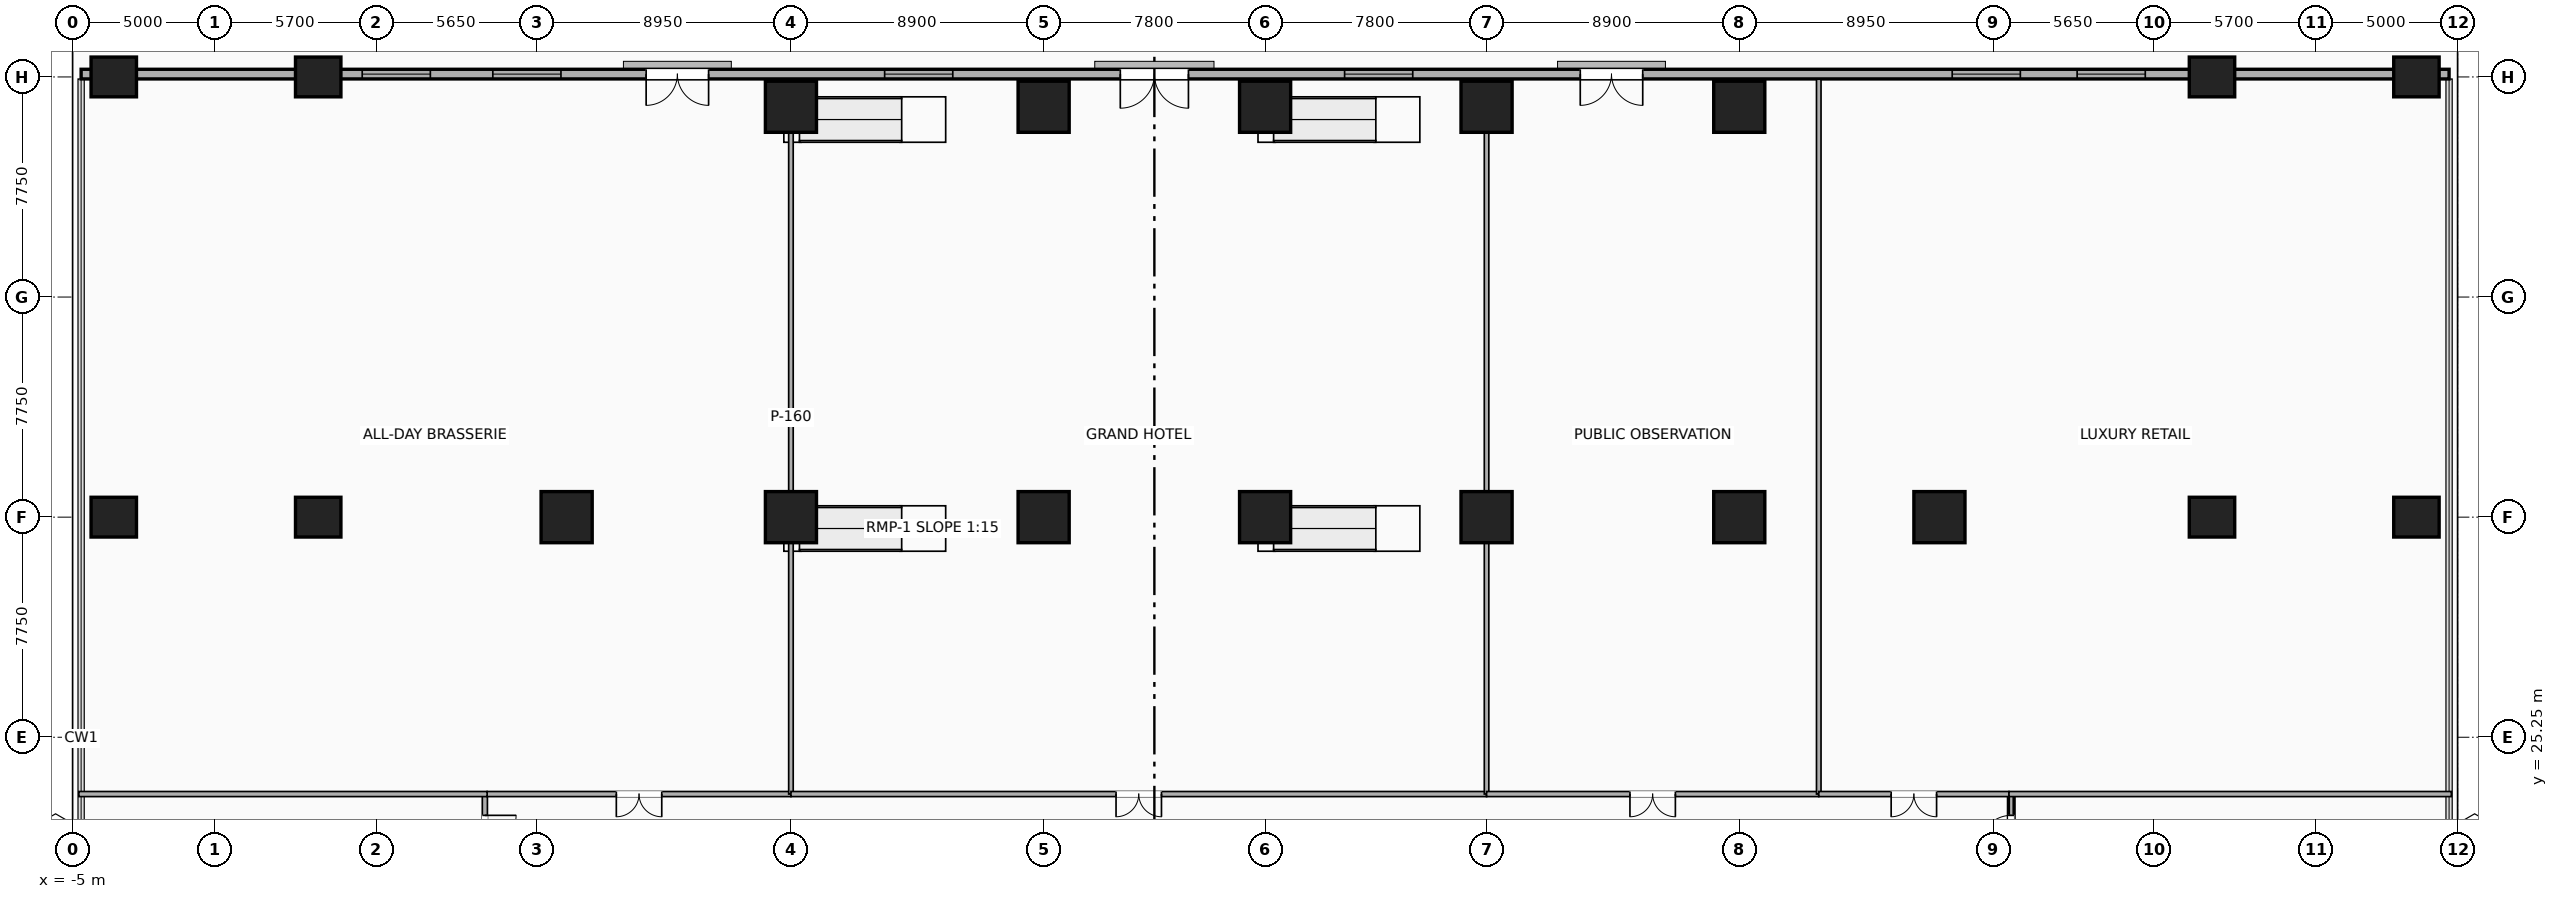
"""IFC4 building model, lengths in metres.
Left out: names, types, materials, properties, quantities, classifications, styles, units other than length and angle.
Written with IfcOpenShell. Run it as: python <this file> out.ifc"""

import sys

from ifc_helpers import new_model, si_unit, direction, frame, frame_2d, origin, origin_2d, place, context, subcontext, project, spatial, rectangle, extrude, element, fill, save


model = new_model("IFC4")
c1 = context("Model", 3, precision=1e-05, world=origin(), true_north=direction((0.0, 1.0)))
c2 = subcontext(c1, "Body", "Model", "MODEL_VIEW")
j1 = project(units=[si_unit("LENGTHUNIT", "METRE"), si_unit("PLANEANGLEUNIT", "RADIAN")], contexts=[c1])
p1 = place(None, origin())
s1 = spatial("IfcSite", under=j1, at=p1, CompositionType="ELEMENT")
p2 = place(p1, origin())
s2 = spatial("IfcBuilding", under=s1, at=p2, CompositionType="ELEMENT")
p3 = place(p2, origin())
s3 = spatial("IfcBuildingStorey", under=s2, at=p3, CompositionType="ELEMENT", Elevation=0.0)
for number, where, z_axis, x_axis in (
    (1, (20.3, 33.0, -0.35), (0.0, 0.0, 1.0), (1.0, 0.0, 0.0)),
    (2, (29.2, 33.0, -0.35), (0.0, 0.0, 1.0), (1.0, 0.0, 0.0)),
    (3, (37.0, 33.0, -0.35), (0.0, 0.0, 1.0), (1.0, 0.0, 0.0)),
    (4, (44.8, 33.0, -0.35), (0.0, 0.0, 1.0), (1.0, 0.0, 0.0)),
    (5, (12.4, 33.0, -0.35), (0.0, 0.0, 1.0), (1.0, 0.0, 0.0)),
    (6, (20.3, 47.45, -0.35), (0.0, 0.0, 1.0), (1.0, 0.0, 0.0)),
    (7, (29.2, 47.45, -0.35), (0.0, 0.0, 1.0), (1.0, 0.0, 0.0)),
    (8, (37.0, 47.45, -0.35), (0.0, 0.0, 1.0), (1.0, 0.0, 0.0)),
    (9, (44.8, 47.45, -0.35), (0.0, 0.0, 1.0), (1.0, 0.0, 0.0)),
    (10, (53.7, 47.45, -0.35), (0.0, 0.0, 1.0), (1.0, 0.0, 0.0)),
    (11, (60.75, 33.0, -0.35), (0.0, 0.0, 1.0), (1.0, 0.0, 0.0)),
    (12, (53.7, 33.0, -0.35), (0.0, 0.0, 1.0), (1.0, 0.0, 0.0)),
):
    element("IfcColumn", number, at=place(p3, frame(where, z_axis=z_axis, x_axis=x_axis)), inside=s3, PredefinedType="COLUMN", context=c2, shape_type="SweptSolid", body=[
        extrude(rectangle(XDim=1.8, YDim=1.8, at=origin_2d()), origin(), (0.0, 0.0, 1.0), 5.45),
    ])
for number, where, z_axis, x_axis in (
    (13, (-3.55, 33.0, -0.35), (0.0, 0.0, 1.0), (1.0, 0.0, 0.0)),
    (14, (3.65, 33.0, -0.35), (0.0, 0.0, 1.0), (1.0, 0.0, 0.0)),
    (15, (-3.55, 48.5, -0.35), (0.0, 0.0, 1.0), (1.0, 0.0, 0.0)),
    (16, (3.65, 48.5, -0.35), (0.0, 0.0, 1.0), (1.0, 0.0, 0.0)),
    (17, (70.35, 33.0, -0.35), (0.0, 0.0, 1.0), (1.0, 0.0, 0.0)),
    (18, (77.55, 33.0, -0.35), (0.0, 0.0, 1.0), (1.0, 0.0, 0.0)),
    (19, (70.35, 48.5, -0.35), (0.0, 0.0, 1.0), (1.0, 0.0, 0.0)),
    (20, (77.55, 48.5, -0.35), (0.0, 0.0, 1.0), (1.0, 0.0, 0.0)),
):
    element("IfcColumn", number, at=place(p3, frame(where, z_axis=z_axis, x_axis=x_axis)), inside=s3, PredefinedType="COLUMN", context=c2, shape_type="SweptSolid", body=[
        extrude(rectangle(XDim=1.6, YDim=1.4, at=origin_2d()), origin(), (0.0, 0.0, 1.0), 5.45),
    ])
p4 = place(p3, frame((-4.7, 48.6, 0.0), z_axis=(0.0, 0.0, 1.0), x_axis=(1.0, 0.0, 0.0)))
e21 = element("IfcWall", 21, at=p4, inside=s3, PredefinedType="SOLIDWALL", context=c2, shape_type="SweptSolid", body=[
    extrude(rectangle(XDim=83.4, YDim=0.34, at=frame_2d((41.7, 0.0))), origin(), (0.0, 0.0, 1.0), 4.164),
])
p5 = place(p4, frame((19.9, 0.0, 0.0)))
e22 = element("IfcOpeningElement", 22, at=p5, cuts=e21, PredefinedType="OPENING", context=c2, shape_type="SweptSolid", body=[
    extrude(rectangle(XDim=2.2, YDim=2.5, at=frame_2d((1.1, 1.25))), frame((0.0, 0.18, 0.0), z_axis=(0.0, -1.0, 0.0), x_axis=(1.0, 0.0, 0.0)), (0.0, 0.0, 1.0), 0.36),
])
p6 = place(p4, frame((36.6, 0.0, 0.0)))
e23 = element("IfcOpeningElement", 23, at=p6, cuts=e21, PredefinedType="OPENING", context=c2, shape_type="SweptSolid", body=[
    extrude(rectangle(XDim=2.4, YDim=2.6, at=frame_2d((1.2, 1.3))), frame((0.0, 0.18, 0.0), z_axis=(0.0, -1.0, 0.0), x_axis=(1.0, 0.0, 0.0)), (0.0, 0.0, 1.0), 0.36),
])
p7 = place(p4, frame((52.8, 0.0, 0.0)))
e24 = element("IfcOpeningElement", 24, at=p7, cuts=e21, PredefinedType="OPENING", context=c2, shape_type="SweptSolid", body=[
    extrude(rectangle(XDim=2.2, YDim=2.5, at=frame_2d((1.1, 1.25))), frame((0.0, 0.18, 0.0), z_axis=(0.0, -1.0, 0.0), x_axis=(1.0, 0.0, 0.0)), (0.0, 0.0, 1.0), 0.36),
])
p8 = place(p4, frame((9.9, 0.0, 0.9)))
e25 = element("IfcOpeningElement", 25, at=p8, cuts=e21, PredefinedType="OPENING", context=c2, shape_type="SweptSolid", body=[
    extrude(rectangle(XDim=2.4, YDim=2.6, at=frame_2d((1.2, 1.3))), frame((0.0, 0.18, 0.0), z_axis=(0.0, -1.0, 0.0), x_axis=(1.0, 0.0, 0.0)), (0.0, 0.0, 1.0), 0.36),
])
p9 = place(p4, frame((14.5, 0.0, 0.9)))
e26 = element("IfcOpeningElement", 26, at=p9, cuts=e21, PredefinedType="OPENING", context=c2, shape_type="SweptSolid", body=[
    extrude(rectangle(XDim=2.4, YDim=2.6, at=frame_2d((1.2, 1.3))), frame((0.0, 0.18, 0.0), z_axis=(0.0, -1.0, 0.0), x_axis=(1.0, 0.0, 0.0)), (0.0, 0.0, 1.0), 0.36),
])
p10 = place(p4, frame((28.3, 0.0, 0.9)))
e27 = element("IfcOpeningElement", 27, at=p10, cuts=e21, PredefinedType="OPENING", context=c2, shape_type="SweptSolid", body=[
    extrude(rectangle(XDim=2.4, YDim=2.6, at=frame_2d((1.2, 1.3))), frame((0.0, 0.18, 0.0), z_axis=(0.0, -1.0, 0.0), x_axis=(1.0, 0.0, 0.0)), (0.0, 0.0, 1.0), 0.36),
])
p11 = place(p4, frame((44.5, 0.0, 0.9)))
e28 = element("IfcOpeningElement", 28, at=p11, cuts=e21, PredefinedType="OPENING", context=c2, shape_type="SweptSolid", body=[
    extrude(rectangle(XDim=2.4, YDim=2.6, at=frame_2d((1.2, 1.3))), frame((0.0, 0.18, 0.0), z_axis=(0.0, -1.0, 0.0), x_axis=(1.0, 0.0, 0.0)), (0.0, 0.0, 1.0), 0.36),
])
p12 = place(p4, frame((65.9, 0.0, 0.9)))
e29 = element("IfcOpeningElement", 29, at=p12, cuts=e21, PredefinedType="OPENING", context=c2, shape_type="SweptSolid", body=[
    extrude(rectangle(XDim=2.4, YDim=2.6, at=frame_2d((1.2, 1.3))), frame((0.0, 0.18, 0.0), z_axis=(0.0, -1.0, 0.0), x_axis=(1.0, 0.0, 0.0)), (0.0, 0.0, 1.0), 0.36),
])
p13 = place(p4, frame((70.3, 0.0, 0.9)))
e30 = element("IfcOpeningElement", 30, at=p13, cuts=e21, PredefinedType="OPENING", context=c2, shape_type="SweptSolid", body=[
    extrude(rectangle(XDim=2.4, YDim=2.6, at=frame_2d((1.2, 1.3))), frame((0.0, 0.18, 0.0), z_axis=(0.0, -1.0, 0.0), x_axis=(1.0, 0.0, 0.0)), (0.0, 0.0, 1.0), 0.36),
])
p14 = place(p3, frame((9.52, 0.35, 0.0), z_axis=(0.0, 0.0, 1.0), x_axis=(0.0, 1.0, 0.0)))
e31 = element("IfcWall", 31, at=p14, inside=s3, PredefinedType="PARTITIONING", context=c2, shape_type="SweptSolid", body=[
    extrude(rectangle(XDim=22.9, YDim=0.18, at=frame_2d((11.45, 0.0))), origin(), (0.0, 0.0, 1.0), 5.1),
])
p15 = place(p14, frame((21.05, 0.0, 0.0)))
e32 = element("IfcOpeningElement", 32, at=p15, cuts=e31, PredefinedType="OPENING", context=c2, shape_type="SweptSolid", body=[
    extrude(rectangle(XDim=1.1, YDim=2.15, at=frame_2d((0.55, 1.075))), frame((0.0, 0.1, 0.0), z_axis=(0.0, -1.0, 0.0), x_axis=(1.0, 0.0, 0.0)), (0.0, 0.0, 1.0), 0.2),
])
p16 = place(p3, frame((63.28, 0.35, 0.0), z_axis=(0.0, 0.0, 1.0), x_axis=(0.0, 1.0, 0.0)))
e33 = element("IfcWall", 33, at=p16, inside=s3, PredefinedType="PARTITIONING", context=c2, shape_type="SweptSolid", body=[
    extrude(rectangle(XDim=22.9, YDim=0.2, at=frame_2d((11.45, 0.0))), origin(), (0.0, 0.0, 1.0), 4.164),
])
p17 = place(p16, frame((22.15, 0.0, 0.0), z_axis=(0.0, 0.0, 1.0), x_axis=(-1.0, 0.0, 0.0)))
e34 = element("IfcOpeningElement", 34, at=p17, cuts=e33, PredefinedType="OPENING", context=c2, shape_type="SweptSolid", body=[
    extrude(rectangle(XDim=1.1, YDim=2.15, at=frame_2d((0.55, 1.075))), frame((0.0, 0.11, 0.0), z_axis=(0.0, -1.0, 0.0), x_axis=(1.0, 0.0, 0.0)), (0.0, 0.0, 1.0), 0.22),
])
p18 = place(p3, frame((9.6, 23.25, 0.0), z_axis=(0.0, 0.0, 1.0), x_axis=(1.0, 0.0, 0.0)))
e35 = element("IfcWall", 35, at=p18, inside=s3, PredefinedType="PARTITIONING", context=c2, shape_type="SweptSolid", body=[
    extrude(rectangle(XDim=10.7, YDim=0.18, at=frame_2d((5.35, 0.0))), origin(), (0.0, 0.0, 1.0), 4.23),
])
p19 = place(p18, frame((4.55, 0.0, 0.0)))
e36 = element("IfcOpeningElement", 36, at=p19, cuts=e35, PredefinedType="OPENING", context=c2, shape_type="SweptSolid", body=[
    extrude(rectangle(XDim=1.6, YDim=2.22, at=frame_2d((0.8, 1.11))), frame((0.0, 0.1, 0.0), z_axis=(0.0, -1.0, 0.0), x_axis=(1.0, 0.0, 0.0)), (0.0, 0.0, 1.0), 0.2),
])
p20 = place(p3, frame((-4.78, 23.25, 0.0), z_axis=(0.0, 0.0, 1.0), x_axis=(1.0, 0.0, 0.0)))
e37 = element("IfcWall", 37, at=p20, inside=s3, PredefinedType="PARTITIONING", context=c2, shape_type="SweptSolid", body=[
    extrude(rectangle(XDim=14.38, YDim=0.18, at=frame_2d((7.19, 0.0))), origin(), (0.0, 0.0, 1.0), 4.23),
])
p21 = place(p3, frame((20.3, 23.25, 0.0), z_axis=(0.0, 0.0, 1.0), x_axis=(0.0, 1.0, 0.0)))
e38 = element("IfcWall", 38, at=p21, inside=s3, PredefinedType="PARTITIONING", context=c2, shape_type="SweptSolid", body=[
    extrude(rectangle(XDim=25.17, YDim=0.16, at=frame_2d((12.585, 0.0))), origin(), (0.0, 0.0, 1.0), 4.164),
])
p22 = place(p3, frame((20.3, 23.25, 0.0), z_axis=(0.0, 0.0, 1.0), x_axis=(1.0, 0.0, 0.0)))
e39 = element("IfcWall", 39, at=p22, inside=s3, PredefinedType="PARTITIONING", context=c2, shape_type="SweptSolid", body=[
    extrude(rectangle(XDim=24.5, YDim=0.18, at=frame_2d((12.25, 0.0))), origin(), (0.0, 0.0, 1.0), 4.23),
])
p23 = place(p22, frame((11.45, 0.0, 0.0)))
e40 = element("IfcOpeningElement", 40, at=p23, cuts=e39, PredefinedType="OPENING", context=c2, shape_type="SweptSolid", body=[
    extrude(rectangle(XDim=1.6, YDim=2.22, at=frame_2d((0.8, 1.11))), frame((0.0, 0.1, 0.0), z_axis=(0.0, -1.0, 0.0), x_axis=(1.0, 0.0, 0.0)), (0.0, 0.0, 1.0), 0.2),
])
p24 = place(p3, frame((44.8, 23.25, 0.0), z_axis=(0.0, 0.0, 1.0), x_axis=(0.0, 1.0, 0.0)))
e41 = element("IfcWall", 41, at=p24, inside=s3, PredefinedType="PARTITIONING", context=c2, shape_type="SweptSolid", body=[
    extrude(rectangle(XDim=25.17, YDim=0.16, at=frame_2d((12.585, 0.0))), origin(), (0.0, 0.0, 1.0), 4.164),
])
p25 = place(p3, frame((44.8, 23.25, 0.0), z_axis=(0.0, 0.0, 1.0), x_axis=(1.0, 0.0, 0.0)))
e42 = element("IfcWall", 42, at=p25, inside=s3, PredefinedType="PARTITIONING", context=c2, shape_type="SweptSolid", body=[
    extrude(rectangle(XDim=11.7, YDim=0.18, at=frame_2d((5.85, 0.0))), origin(), (0.0, 0.0, 1.0), 4.23),
])
p26 = place(p25, frame((5.05, 0.0, 0.0)))
e43 = element("IfcOpeningElement", 43, at=p26, cuts=e42, PredefinedType="OPENING", context=c2, shape_type="SweptSolid", body=[
    extrude(rectangle(XDim=1.6, YDim=2.22, at=frame_2d((0.8, 1.11))), frame((0.0, 0.1, 0.0), z_axis=(0.0, -1.0, 0.0), x_axis=(1.0, 0.0, 0.0)), (0.0, 0.0, 1.0), 0.2),
])
p27 = place(p3, frame((56.5, 23.25, 0.0), z_axis=(0.0, 0.0, 1.0), x_axis=(0.0, 1.0, 0.0)))
e44 = element("IfcWall", 44, at=p27, inside=s3, PredefinedType="PARTITIONING", context=c2, shape_type="SweptSolid", body=[
    extrude(rectangle(XDim=25.17, YDim=0.16, at=frame_2d((12.585, 0.0))), origin(), (0.0, 0.0, 1.0), 4.164),
])
p28 = place(p3, frame((56.5, 23.25, 0.0), z_axis=(0.0, 0.0, 1.0), x_axis=(1.0, 0.0, 0.0)))
e45 = element("IfcWall", 45, at=p28, inside=s3, PredefinedType="PARTITIONING", context=c2, shape_type="SweptSolid", body=[
    extrude(rectangle(XDim=6.7, YDim=0.18, at=frame_2d((3.35, 0.0))), origin(), (0.0, 0.0, 1.0), 4.23),
])
p29 = place(p28, frame((2.55, 0.0, 0.0)))
e46 = element("IfcOpeningElement", 46, at=p29, cuts=e45, PredefinedType="OPENING", context=c2, shape_type="SweptSolid", body=[
    extrude(rectangle(XDim=1.6, YDim=2.22, at=frame_2d((0.8, 1.11))), frame((0.0, 0.1, 0.0), z_axis=(0.0, -1.0, 0.0), x_axis=(1.0, 0.0, 0.0)), (0.0, 0.0, 1.0), 0.2),
])
p30 = place(p3, frame((63.2, 23.25, 0.0), z_axis=(0.0, 0.0, 1.0), x_axis=(1.0, 0.0, 0.0)))
e47 = element("IfcWall", 47, at=p30, inside=s3, PredefinedType="PARTITIONING", context=c2, shape_type="SweptSolid", body=[
    extrude(rectangle(XDim=15.58, YDim=0.18, at=frame_2d((7.79, 0.0))), origin(), (0.0, 0.0, 1.0), 4.23),
])
p31 = place(p5, origin())
e48 = element("IfcDoor", 48, at=p31, inside=s3, OperationType="DOUBLE_DOOR_SINGLE_SWING", PredefinedType="DOOR", context=c2, shape_type="SweptSolid", body=[
    extrude(rectangle(XDim=2.2, YDim=2.5, at=frame_2d((1.1, 1.25))), frame((0.0, 0.025, 0.0), z_axis=(0.0, -1.0, 0.0), x_axis=(1.0, 0.0, 0.0)), (0.0, 0.0, 1.0), 0.05),
])
fill(e22, e48)
p32 = place(p6, origin())
e49 = element("IfcDoor", 49, at=p32, inside=s3, OperationType="DOUBLE_DOOR_SINGLE_SWING", PredefinedType="DOOR", context=c2, shape_type="SweptSolid", body=[
    extrude(rectangle(XDim=2.4, YDim=2.6, at=frame_2d((1.2, 1.3))), frame((0.0, 0.025, 0.0), z_axis=(0.0, -1.0, 0.0), x_axis=(1.0, 0.0, 0.0)), (0.0, 0.0, 1.0), 0.05),
])
fill(e23, e49)
p33 = place(p7, origin())
e50 = element("IfcDoor", 50, at=p33, inside=s3, OperationType="DOUBLE_DOOR_SINGLE_SWING", PredefinedType="DOOR", context=c2, shape_type="SweptSolid", body=[
    extrude(rectangle(XDim=2.2, YDim=2.5, at=frame_2d((1.1, 1.25))), frame((0.0, 0.025, 0.0), z_axis=(0.0, -1.0, 0.0), x_axis=(1.0, 0.0, 0.0)), (0.0, 0.0, 1.0), 0.05),
])
fill(e24, e50)
p34 = place(p8, origin())
e51 = element("IfcWindow", 51, at=p34, inside=s3, PartitioningType="SINGLE_PANEL", PredefinedType="WINDOW", context=c2, shape_type="SweptSolid", body=[
    extrude(rectangle(XDim=2.4, YDim=2.6, at=frame_2d((1.2, 1.3))), frame((0.0, 0.03, 0.0), z_axis=(0.0, -1.0, 0.0), x_axis=(1.0, 0.0, 0.0)), (0.0, 0.0, 1.0), 0.06),
])
fill(e25, e51)
p35 = place(p9, origin())
e52 = element("IfcWindow", 52, at=p35, inside=s3, PartitioningType="SINGLE_PANEL", PredefinedType="WINDOW", context=c2, shape_type="SweptSolid", body=[
    extrude(rectangle(XDim=2.4, YDim=2.6, at=frame_2d((1.2, 1.3))), frame((0.0, 0.03, 0.0), z_axis=(0.0, -1.0, 0.0), x_axis=(1.0, 0.0, 0.0)), (0.0, 0.0, 1.0), 0.06),
])
fill(e26, e52)
p36 = place(p10, origin())
e53 = element("IfcWindow", 53, at=p36, inside=s3, PartitioningType="SINGLE_PANEL", PredefinedType="WINDOW", context=c2, shape_type="SweptSolid", body=[
    extrude(rectangle(XDim=2.4, YDim=2.6, at=frame_2d((1.2, 1.3))), frame((0.0, 0.03, 0.0), z_axis=(0.0, -1.0, 0.0), x_axis=(1.0, 0.0, 0.0)), (0.0, 0.0, 1.0), 0.06),
])
fill(e27, e53)
p37 = place(p11, origin())
e54 = element("IfcWindow", 54, at=p37, inside=s3, PartitioningType="SINGLE_PANEL", PredefinedType="WINDOW", context=c2, shape_type="SweptSolid", body=[
    extrude(rectangle(XDim=2.4, YDim=2.6, at=frame_2d((1.2, 1.3))), frame((0.0, 0.03, 0.0), z_axis=(0.0, -1.0, 0.0), x_axis=(1.0, 0.0, 0.0)), (0.0, 0.0, 1.0), 0.06),
])
fill(e28, e54)
p38 = place(p12, origin())
e55 = element("IfcWindow", 55, at=p38, inside=s3, PartitioningType="SINGLE_PANEL", PredefinedType="WINDOW", context=c2, shape_type="SweptSolid", body=[
    extrude(rectangle(XDim=2.4, YDim=2.6, at=frame_2d((1.2, 1.3))), frame((0.0, 0.03, 0.0), z_axis=(0.0, -1.0, 0.0), x_axis=(1.0, 0.0, 0.0)), (0.0, 0.0, 1.0), 0.06),
])
fill(e29, e55)
p39 = place(p13, origin())
e56 = element("IfcWindow", 56, at=p39, inside=s3, PartitioningType="SINGLE_PANEL", PredefinedType="WINDOW", context=c2, shape_type="SweptSolid", body=[
    extrude(rectangle(XDim=2.4, YDim=2.6, at=frame_2d((1.2, 1.3))), frame((0.0, 0.03, 0.0), z_axis=(0.0, -1.0, 0.0), x_axis=(1.0, 0.0, 0.0)), (0.0, 0.0, 1.0), 0.06),
])
fill(e30, e56)
p40 = place(p15, origin())
e57 = element("IfcDoor", 57, at=p40, inside=s3, OperationType="SINGLE_SWING_RIGHT", PredefinedType="DOOR", context=c2, shape_type="SweptSolid", body=[
    extrude(rectangle(XDim=1.1, YDim=2.15, at=frame_2d((0.55, 1.075))), frame((0.0, 0.025, 0.0), z_axis=(0.0, -1.0, 0.0), x_axis=(1.0, 0.0, 0.0)), (0.0, 0.0, 1.0), 0.05),
])
fill(e32, e57)
p41 = place(p17, origin())
e58 = element("IfcDoor", 58, at=p41, inside=s3, OperationType="SINGLE_SWING_LEFT", PredefinedType="DOOR", context=c2, shape_type="SweptSolid", body=[
    extrude(rectangle(XDim=1.1, YDim=2.15, at=frame_2d((0.55, 1.075))), frame((0.0, 0.025, 0.0), z_axis=(0.0, -1.0, 0.0), x_axis=(1.0, 0.0, 0.0)), (0.0, 0.0, 1.0), 0.05),
])
fill(e34, e58)
p42 = place(p19, origin())
e59 = element("IfcDoor", 59, at=p42, inside=s3, OperationType="DOUBLE_DOOR_SINGLE_SWING", PredefinedType="DOOR", context=c2, shape_type="SweptSolid", body=[
    extrude(rectangle(XDim=1.6, YDim=2.22, at=frame_2d((0.8, 1.11))), frame((0.0, 0.025, 0.0), z_axis=(0.0, -1.0, 0.0), x_axis=(1.0, 0.0, 0.0)), (0.0, 0.0, 1.0), 0.05),
])
fill(e36, e59)
p43 = place(p23, origin())
e60 = element("IfcDoor", 60, at=p43, inside=s3, OperationType="DOUBLE_DOOR_SINGLE_SWING", PredefinedType="DOOR", context=c2, shape_type="SweptSolid", body=[
    extrude(rectangle(XDim=1.6, YDim=2.22, at=frame_2d((0.8, 1.11))), frame((0.0, 0.025, 0.0), z_axis=(0.0, -1.0, 0.0), x_axis=(1.0, 0.0, 0.0)), (0.0, 0.0, 1.0), 0.05),
])
fill(e40, e60)
p44 = place(p26, origin())
e61 = element("IfcDoor", 61, at=p44, inside=s3, OperationType="DOUBLE_DOOR_SINGLE_SWING", PredefinedType="DOOR", context=c2, shape_type="SweptSolid", body=[
    extrude(rectangle(XDim=1.6, YDim=2.22, at=frame_2d((0.8, 1.11))), frame((0.0, 0.025, 0.0), z_axis=(0.0, -1.0, 0.0), x_axis=(1.0, 0.0, 0.0)), (0.0, 0.0, 1.0), 0.05),
])
fill(e43, e61)
p45 = place(p29, origin())
e62 = element("IfcDoor", 62, at=p45, inside=s3, OperationType="DOUBLE_DOOR_SINGLE_SWING", PredefinedType="DOOR", context=c2, shape_type="SweptSolid", body=[
    extrude(rectangle(XDim=1.6, YDim=2.22, at=frame_2d((0.8, 1.11))), frame((0.0, 0.025, 0.0), z_axis=(0.0, -1.0, 0.0), x_axis=(1.0, 0.0, 0.0)), (0.0, 0.0, 1.0), 0.05),
])
fill(e46, e62)
save(model, sys.argv[1])
